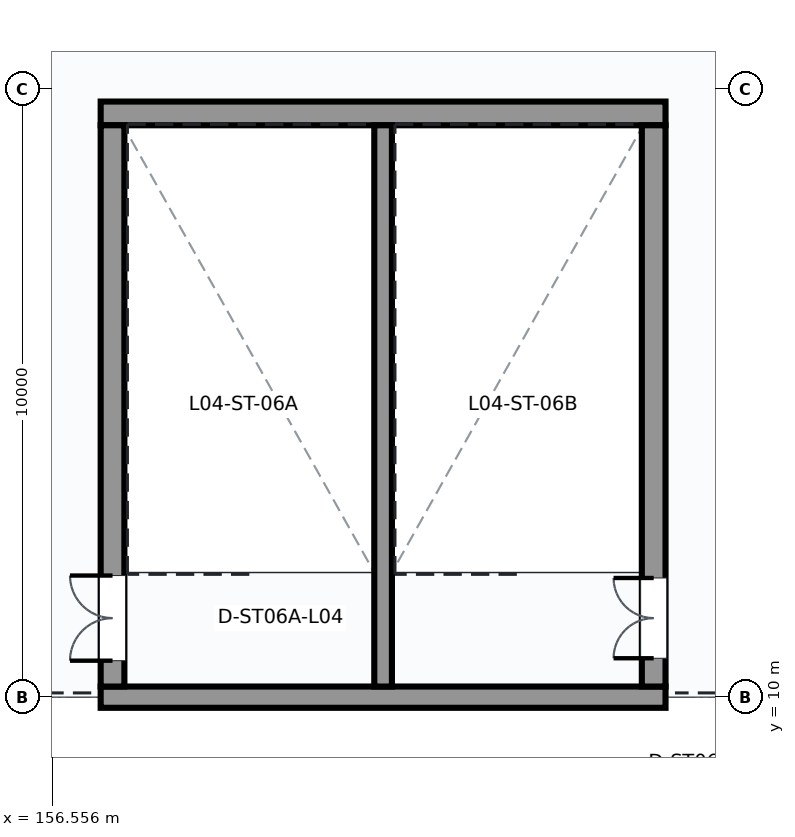
"""IFC4 building model, lengths in metres.
Left out: names, types, materials, properties, quantities, classifications, styles, units other than length and angle.
Written with IfcOpenShell. Run it as: python <this file> out.ifc"""

import sys

from ifc_helpers import new_model, si_unit, direction, frame, frame_2d, origin, place, context, subcontext, project, spatial, rectangle, extrude, element, fill, save


model = new_model("IFC4")
c1 = context("Model", 3, precision=1e-05, world=origin(), true_north=direction((0.0, 1.0)))
c2 = subcontext(c1, "Body", "Model", "MODEL_VIEW")
j1 = project(units=[si_unit("LENGTHUNIT", "METRE"), si_unit("PLANEANGLEUNIT", "RADIAN")], contexts=[c1])
p1 = place(None, origin())
s1 = spatial("IfcSite", under=j1, at=p1, CompositionType="ELEMENT")
p2 = place(p1, origin())
s2 = spatial("IfcBuilding", under=s1, at=p2, CompositionType="ELEMENT")
p3 = place(p2, frame((0.0, 0.0, 19.2)))
s3 = spatial("IfcBuildingStorey", under=s2, at=p3, CompositionType="ELEMENT", Elevation=19.2)
p4 = place(p3, frame((157.355, 10.0, 0.0), z_axis=(0.0, 0.0, 1.0), x_axis=(1.0, 0.0, 0.0)))
e1 = element("IfcWall", 1, at=p4, inside=s3, PredefinedType="SHEAR", context=c2, shape_type="SweptSolid", body=[
    extrude(rectangle(XDim=9.29, YDim=0.35, at=frame_2d((4.645, 0.0))), origin(), (0.0, 0.0, 1.0), 5.4),
])
p5 = place(p3, frame((157.355, 19.6, 0.0), z_axis=(0.0, 0.0, 1.0), x_axis=(1.0, 0.0, 0.0)))
e2 = element("IfcWall", 2, at=p5, inside=s3, PredefinedType="SHEAR", context=c2, shape_type="SweptSolid", body=[
    extrude(rectangle(XDim=9.29, YDim=0.39, at=frame_2d((4.645, 0.0))), origin(), (0.0, 0.0, 1.0), 5.4),
])
p6 = place(p3, frame((157.55, 10.175, 0.0), z_axis=(0.0, 0.0, 1.0), x_axis=(0.0, 1.0, 0.0)))
e3 = element("IfcWall", 3, at=p6, inside=s3, PredefinedType="SHEAR", context=c2, shape_type="SweptSolid", body=[
    extrude(rectangle(XDim=9.23, YDim=0.39, at=frame_2d((4.615, 0.0))), origin(), (0.0, 0.0, 1.0), 5.4),
])
p7 = place(p6, frame((0.425, 0.0, 0.0)))
e4 = element("IfcOpeningElement", 4, at=p7, cuts=e3, PredefinedType="OPENING", context=c2, shape_type="SweptSolid", body=[
    extrude(rectangle(XDim=1.4, YDim=2.2, at=frame_2d((0.7, 1.1))), frame((0.0, 0.205, 0.0), z_axis=(0.0, -1.0, 0.0), x_axis=(1.0, 0.0, 0.0)), (0.0, 0.0, 1.0), 0.41),
])
p8 = place(p3, frame((166.45, 10.175, 0.0), z_axis=(0.0, 0.0, 1.0), x_axis=(0.0, 1.0, 0.0)))
e5 = element("IfcWall", 5, at=p8, inside=s3, PredefinedType="SHEAR", context=c2, shape_type="SweptSolid", body=[
    extrude(rectangle(XDim=9.23, YDim=0.39, at=frame_2d((4.615, 0.0))), origin(), (0.0, 0.0, 1.0), 5.4),
])
p9 = place(p8, frame((0.465, 0.0, 0.0)))
e6 = element("IfcOpeningElement", 6, at=p9, cuts=e5, PredefinedType="OPENING", context=c2, shape_type="SweptSolid", body=[
    extrude(rectangle(XDim=1.32, YDim=2.2, at=frame_2d((0.66, 1.1))), frame((0.0, 0.205, 0.0), z_axis=(0.0, -1.0, 0.0), x_axis=(1.0, 0.0, 0.0)), (0.0, 0.0, 1.0), 0.41),
])
p10 = place(p3, frame((162.0, 10.175, 0.0), z_axis=(0.0, 0.0, 1.0), x_axis=(0.0, 1.0, 0.0)))
e7 = element("IfcWall", 7, at=p10, inside=s3, PredefinedType="SHEAR", context=c2, shape_type="SweptSolid", body=[
    extrude(rectangle(XDim=9.23, YDim=0.29, at=frame_2d((4.615, 0.0))), origin(), (0.0, 0.0, 1.0), 5.4),
])
p11 = place(p7, frame((1.4, 0.0, 0.0), z_axis=(0.0, 0.0, 1.0), x_axis=(-1.0, 0.0, 0.0)))
e8 = element("IfcDoor", 8, at=p11, inside=s3, OperationType="DOUBLE_DOOR_SINGLE_SWING", PredefinedType="DOOR", context=c2, shape_type="SweptSolid", body=[
    extrude(rectangle(XDim=1.4, YDim=2.2, at=frame_2d((0.7, 1.1))), frame((0.0, 0.025, 0.0), z_axis=(0.0, -1.0, 0.0), x_axis=(1.0, 0.0, 0.0)), (0.0, 0.0, 1.0), 0.05),
])
fill(e4, e8)
p12 = place(p9, origin())
e9 = element("IfcDoor", 9, at=p12, inside=s3, OperationType="DOUBLE_DOOR_SINGLE_SWING", PredefinedType="DOOR", context=c2, shape_type="SweptSolid", body=[
    extrude(rectangle(XDim=1.32, YDim=2.2, at=frame_2d((0.66, 1.1))), frame((0.0, 0.025, 0.0), z_axis=(0.0, -1.0, 0.0), x_axis=(1.0, 0.0, 0.0)), (0.0, 0.0, 1.0), 0.05),
])
fill(e6, e9)
save(model, sys.argv[1])
